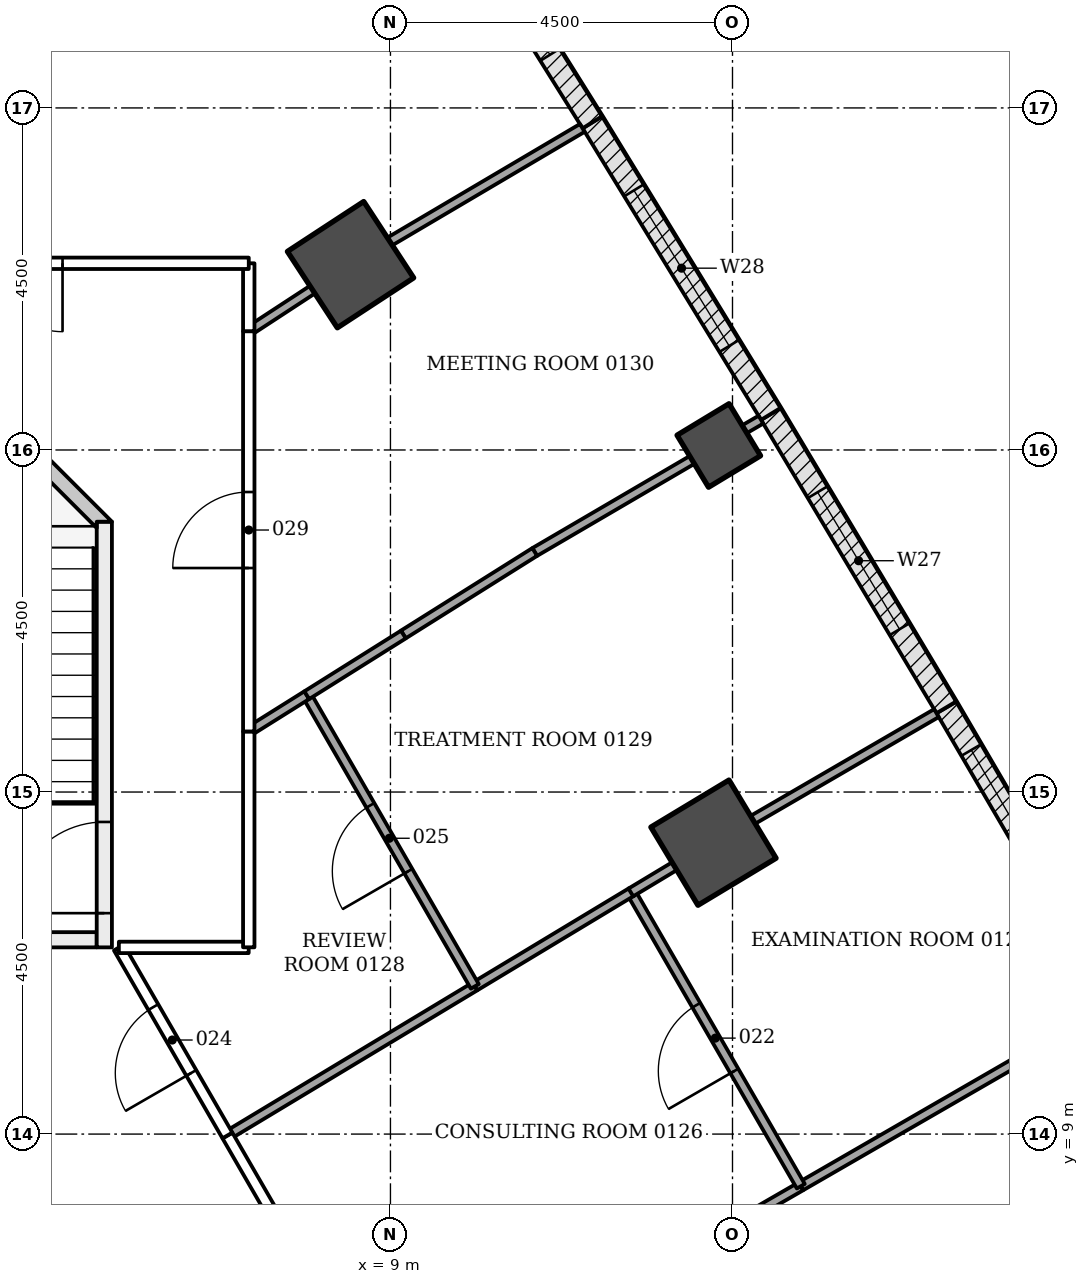
"""IFC4 building model, lengths in metres.
Left out: names, types, materials, properties, quantities, classifications, styles, units other than length and angle.
Written with IfcOpenShell. Run it as: python <this file> out.ifc"""

import sys

from ifc_helpers import new_model, si_unit, direction, frame, frame_2d, origin, origin_2d, place, context, subcontext, project, spatial, polyline, rectangle, outline, extrude, element, fill, save


model = new_model("IFC4")
c1 = context("Model", 3, precision=1e-05, world=origin(), true_north=direction((0.0, 1.0)))
c2 = subcontext(c1, "Body", "Model", "MODEL_VIEW")
j1 = project(units=[si_unit("LENGTHUNIT", "METRE"), si_unit("PLANEANGLEUNIT", "RADIAN")], contexts=[c1])
p1 = place(None, origin())
s1 = spatial("IfcSite", under=j1, at=p1, CompositionType="ELEMENT")
p2 = place(p1, origin())
s2 = spatial("IfcBuilding", under=s1, at=p2, CompositionType="ELEMENT")
p3 = place(p2, frame((0.0, 0.0, 6.0)))
s3 = spatial("IfcBuildingStorey", under=s2, at=p3, CompositionType="ELEMENT", Elevation=6.0)
for number, where, z_axis, x_axis in (
    (1, (13.25, 12.834, -0.25), (0.0, 0.0, 1.0), (0.857, 0.516, 0.0)),
    (2, (8.475, 20.438, -0.25), (0.0, 0.0, 1.0), (0.837, 0.547, 0.0)),
):
    element("IfcColumn", number, at=place(p3, frame(where, z_axis=z_axis, x_axis=x_axis)), inside=s3, PredefinedType="COLUMN", context=c2, shape_type="SweptSolid", body=[
        extrude(rectangle(XDim=1.2, YDim=1.2, at=origin_2d()), origin(), (0.0, 0.0, 1.0), 4.5),
    ])
p4 = place(p3, frame((13.32, 18.059, -0.25), z_axis=(0.0, 0.0, 1.0), x_axis=(0.855574189811, 0.517680215702, 0.0)))
e3 = element("IfcColumn", 3, at=p4, inside=s3, PredefinedType="COLUMN", context=c2, shape_type="SweptSolid", body=[
    extrude(rectangle(XDim=0.8, YDim=0.8, at=origin_2d()), origin(), (0.0, 0.0, 1.0), 4.5),
])
p5 = place(p3, frame((10.311, -4.703, -0.25), z_axis=(0.0, 0.0, 1.0), x_axis=(-0.500001446645, 0.866024568562, 0.0)))
e4 = element("IfcWall", 4, at=p5, inside=s3, PredefinedType="SHEAR", context=c2, shape_type="SweptSolid", body=[
    extrude(rectangle(XDim=18.458, YDim=0.7, at=frame_2d((9.229, 0.0))), origin(), (0.0, 0.0, 1.0), 4.5),
])
p6 = place(p5, frame((8.7, 0.0, 0.25)))
e5 = element("IfcOpeningElement", 5, at=p6, cuts=e4, PredefinedType="OPENING", context=c2, shape_type="SweptSolid", body=[
    extrude(rectangle(XDim=1.0, YDim=2.1, at=frame_2d((0.5, 1.05))), frame((0.0, 0.36, 0.0), z_axis=(0.0, -1.0, 0.0), x_axis=(1.0, 0.0, 0.0)), (0.0, 0.0, 1.0), 0.72),
])
p7 = place(p5, frame((4.002, 0.0, 0.25)))
e6 = element("IfcOpeningElement", 6, at=p7, cuts=e4, PredefinedType="OPENING", context=c2, shape_type="SweptSolid", body=[
    extrude(rectangle(XDim=0.9, YDim=2.1, at=frame_2d((0.45, 1.05))), frame((0.0, 0.36, 0.0), z_axis=(0.0, -1.0, 0.0), x_axis=(1.0, 0.0, 0.0)), (0.0, 0.0, 1.0), 0.72),
])
p8 = place(p5, frame((14.093, 0.0, 0.25)))
e7 = element("IfcOpeningElement", 7, at=p8, cuts=e4, PredefinedType="OPENING", context=c2, shape_type="SweptSolid", body=[
    extrude(rectangle(XDim=0.9, YDim=2.1, at=frame_2d((0.45, 1.05))), frame((0.0, 0.36, 0.0), z_axis=(0.0, -1.0, 0.0), x_axis=(1.0, 0.0, 0.0)), (0.0, 0.0, 1.0), 0.72),
])
p9 = place(p3, frame((16.314, 14.612, 0.0), z_axis=(0.0, 0.0, 1.0), x_axis=(0.50445499627, -0.86343798662, 0.0)))
e8 = element("IfcWall", 8, at=p9, inside=s3, PredefinedType="NOTDEFINED", context=c2, shape_type="SweptSolid", body=[
    extrude(rectangle(XDim=4.496, YDim=0.3, at=frame_2d((2.248, 0.0))), origin(), (0.0, 0.0, 1.0), 4.25),
])
p10 = place(p9, frame((0.648, 0.0, 0.8)))
e9 = element("IfcOpeningElement", 9, at=p10, cuts=e8, PredefinedType="OPENING", context=c2, shape_type="SweptSolid", body=[
    extrude(rectangle(XDim=3.2, YDim=2.7, at=frame_2d((1.6, 1.35))), frame((0.0, 0.16, 0.0), z_axis=(0.0, -1.0, 0.0), x_axis=(1.0, 0.0, 0.0)), (0.0, 0.0, 1.0), 0.32),
])
p11 = place(p3, frame((14.005, 18.472, 0.0), z_axis=(0.0, 0.0, 1.0), x_axis=(0.513257465408, -0.858234684805, 0.0)))
e10 = element("IfcWall", 10, at=p11, inside=s3, PredefinedType="NOTDEFINED", context=c2, shape_type="SweptSolid", body=[
    extrude(rectangle(XDim=4.496, YDim=0.3, at=frame_2d((2.248, 0.0))), origin(), (0.0, 0.0, 1.0), 4.25),
])
p12 = place(p11, frame((1.198, 0.0, 0.8)))
e11 = element("IfcOpeningElement", 11, at=p12, cuts=e10, PredefinedType="OPENING", context=c2, shape_type="SweptSolid", body=[
    extrude(rectangle(XDim=2.1, YDim=3.0, at=frame_2d((1.05, 1.5))), frame((0.0, 0.16, 0.0), z_axis=(0.0, -1.0, 0.0), x_axis=(1.0, 0.0, 0.0)), (0.0, 0.0, 1.0), 0.32),
])
p13 = place(p3, frame((11.656, 22.309, 0.0), z_axis=(0.0, 0.0, 1.0), x_axis=(0.522078085402, -0.852897691838, 0.0)))
e12 = element("IfcWall", 12, at=p13, inside=s3, PredefinedType="NOTDEFINED", context=c2, shape_type="SweptSolid", body=[
    extrude(rectangle(XDim=4.496, YDim=0.3, at=frame_2d((2.248, 0.0))), origin(), (0.0, 0.0, 1.0), 4.25),
])
p14 = place(p13, frame((1.048, 0.0, 0.9)))
e13 = element("IfcOpeningElement", 13, at=p14, cuts=e12, PredefinedType="OPENING", context=c2, shape_type="SweptSolid", body=[
    extrude(rectangle(XDim=2.4, YDim=2.4, at=frame_2d((1.2, 1.2))), frame((0.0, 0.16, 0.0), z_axis=(0.0, -1.0, 0.0), x_axis=(1.0, 0.0, 0.0)), (0.0, 0.0, 1.0), 0.32),
])
p15 = place(p3, frame((9.269, 26.122, 0.0), z_axis=(0.0, 0.0, 1.0), x_axis=(0.530804082031, -0.847494558389, 0.0)))
e14 = element("IfcWall", 14, at=p15, inside=s3, PredefinedType="NOTDEFINED", context=c2, shape_type="SweptSolid", body=[
    extrude(rectangle(XDim=4.496, YDim=0.3, at=frame_2d((2.248, 0.0))), origin(), (0.0, 0.0, 1.0), 4.25),
])
p16 = place(p15, frame((1.048, 0.0, 0.9)))
e15 = element("IfcOpeningElement", 15, at=p16, cuts=e14, PredefinedType="OPENING", context=c2, shape_type="SweptSolid", body=[
    extrude(rectangle(XDim=2.4, YDim=2.4, at=frame_2d((1.2, 1.2))), frame((0.0, 0.16, 0.0), z_axis=(0.0, -1.0, 0.0), x_axis=(1.0, 0.0, 0.0)), (0.0, 0.0, 1.0), 0.32),
])
p17 = place(p3, frame((5.135, 11.556, -0.25), z_axis=(0.0, 0.0, 1.0), x_axis=(-1.0, 0.0, 0.0)))
e16 = element("IfcWall", 16, at=p17, inside=s3, PredefinedType="SHEAR", context=c2, shape_type="SweptSolid", body=[
    extrude(rectangle(XDim=3.55, YDim=0.2, at=frame_2d((1.775, 0.0))), origin(), (0.0, 0.0, 1.0), 4.5),
])
p18 = place(p17, frame((1.175, 0.0, 0.25)))
e17 = element("IfcOpeningElement", 17, at=p18, cuts=e16, PredefinedType="OPENING", context=c2, shape_type="SweptSolid", body=[
    extrude(rectangle(XDim=1.2, YDim=2.1, at=frame_2d((0.6, 1.05))), frame((0.0, 0.11, 0.0), z_axis=(0.0, -1.0, 0.0), x_axis=(1.0, 0.0, 0.0)), (0.0, 0.0, 1.0), 0.22),
])
p19 = place(p3, frame((5.236, 11.456, -0.25), z_axis=(0.0, 0.0, 1.0), x_axis=(0.0, 1.0, 0.0)))
e18 = element("IfcWall", 18, at=p19, inside=s3, PredefinedType="SHEAR", context=c2, shape_type="SweptSolid", body=[
    extrude(rectangle(XDim=5.6, YDim=0.2, at=frame_2d((2.8, 0.0))), origin(), (0.0, 0.0, 1.0), 4.5),
])
p20 = place(p19, frame((0.45, 0.0, 0.25)))
e19 = element("IfcOpeningElement", 19, at=p20, cuts=e18, PredefinedType="OPENING", context=c2, shape_type="SweptSolid", body=[
    extrude(rectangle(XDim=1.2, YDim=2.1, at=frame_2d((0.6, 1.05))), frame((0.0, 0.11, 0.0), z_axis=(0.0, -1.0, 0.0), x_axis=(1.0, 0.0, 0.0)), (0.0, 0.0, 1.0), 0.22),
])
p21 = place(p3, frame((0.0, 0.0, -0.25)))
e20 = element("IfcWall", 20, at=p21, inside=s3, PredefinedType="SHEAR", context=c2, shape_type="SweptSolid", body=[
    extrude(outline(polyline([(5.336, 17.056), (3.736, 18.656), (1.586, 18.656), (1.586, 18.456), (3.653, 18.456), (5.135, 16.974), (5.135, 17.056), (5.135, 17.056), (5.135, 17.056), (5.135, 17.056), (5.135, 17.056), (5.135, 17.056), (5.135, 17.056), (5.135, 17.056), (5.135, 17.056), (5.135, 17.056), (5.135, 17.056), (5.135, 17.056), (5.135, 17.056), (5.135, 17.056), (5.135, 17.056), (5.135, 17.056), (5.135, 17.056), (5.336, 17.056)])), origin(), (0.0, 0.0, 1.0), 4.5),
])
p22 = place(p3, frame((9.03, 5.215, 0.0), z_axis=(0.0, 0.0, 1.0), x_axis=(-0.500070818246, 0.86598451299, 0.0)))
e21 = element("IfcWall", 21, at=p22, inside=s3, PredefinedType="PARTITIONING", context=c2, shape_type="SweptSolid", body=[
    extrude(rectangle(XDim=4.347, YDim=0.15, at=frame_2d((2.174, 0.0))), origin(), (0.0, 0.0, 1.0), 3.638),
])
p23 = place(p22, frame((1.65, 0.0, 0.0)))
e22 = element("IfcOpeningElement", 22, at=p23, cuts=e21, PredefinedType="OPENING", context=c2, shape_type="SweptSolid", body=[
    extrude(rectangle(XDim=1.0, YDim=2.1, at=frame_2d((0.5, 1.05))), frame((0.0, 0.085, 0.0), z_axis=(0.0, -1.0, 0.0), x_axis=(1.0, 0.0, 0.0)), (0.0, 0.0, 1.0), 0.17),
])
p24 = place(p3, frame((6.855, 8.982, 0.0), z_axis=(0.0, 0.0, 1.0), x_axis=(-0.500176439337, 0.865923512519, 0.0)))
e23 = element("IfcWall", 23, at=p24, inside=s3, PredefinedType="PARTITIONING", context=c2, shape_type="SweptSolid", body=[
    extrude(rectangle(XDim=2.855, YDim=0.15, at=frame_2d((1.427, 0.0))), origin(), (0.0, 0.0, 1.0), 3.638),
])
p25 = place(p24, frame((0.95, 0.0, 0.0)))
e24 = element("IfcOpeningElement", 24, at=p25, cuts=e23, PredefinedType="OPENING", context=c2, shape_type="SweptSolid", body=[
    extrude(rectangle(XDim=1.0, YDim=2.1, at=frame_2d((0.5, 1.05))), frame((0.0, 0.085, 0.0), z_axis=(0.0, -1.0, 0.0), x_axis=(1.0, 0.0, 0.0)), (0.0, 0.0, 1.0), 0.17),
])
p26 = place(p3, frame((5.427, 11.456, 0.0), z_axis=(0.0, 0.0, 1.0), x_axis=(1.0, 0.0, 0.0)))
e25 = element("IfcWall", 25, at=p26, inside=s3, PredefinedType="PARTITIONING", context=c2, shape_type="SweptSolid", body=[
    extrude(rectangle(XDim=1.708, YDim=0.15, at=frame_2d((0.854, 0.0))), origin(), (0.0, 0.0, 1.0), 4.25),
])
p27 = place(p3, frame((7.136, 11.457, 0.0), z_axis=(0.0, 0.0, 1.0), x_axis=(0.0, 1.0, 0.0)))
e26 = element("IfcWall", 26, at=p27, inside=s3, PredefinedType="PARTITIONING", context=c2, shape_type="SweptSolid", body=[
    extrude(rectangle(XDim=2.839, YDim=0.15, at=frame_2d((1.419, 0.0))), origin(), (0.0, 0.0, 1.0), 3.638),
])
p28 = place(p3, frame((7.136, 14.297, 0.0), z_axis=(0.0, 0.0, 1.0), x_axis=(0.0, 1.0, 0.0)))
e27 = element("IfcWall", 27, at=p28, inside=s3, PredefinedType="PARTITIONING", context=c2, shape_type="SweptSolid", body=[
    extrude(rectangle(XDim=5.265, YDim=0.15, at=frame_2d((2.632, 0.0))), origin(), (0.0, 0.0, 1.0), 3.638),
])
p29 = place(p28, frame((2.15, 0.0, 0.0)))
e28 = element("IfcOpeningElement", 28, at=p29, cuts=e27, PredefinedType="OPENING", context=c2, shape_type="SweptSolid", body=[
    extrude(rectangle(XDim=1.0, YDim=2.1, at=frame_2d((0.5, 1.05))), frame((0.0, 0.085, 0.0), z_axis=(0.0, -1.0, 0.0), x_axis=(1.0, 0.0, 0.0)), (0.0, 0.0, 1.0), 0.17),
])
p30 = place(p3, frame((7.136, 19.563, 0.0), z_axis=(0.0, 0.0, 1.0), x_axis=(0.0, 1.0, 0.0)))
e29 = element("IfcWall", 29, at=p30, inside=s3, PredefinedType="PARTITIONING", context=c2, shape_type="SweptSolid", body=[
    extrude(rectangle(XDim=0.893, YDim=0.15, at=frame_2d((0.447, 0.0))), origin(), (0.0, 0.0, 1.0), 3.638),
])
p31 = place(p3, frame((7.136, 20.456, 0.0), z_axis=(0.0, 0.0, 1.0), x_axis=(-1.0, 0.0, 0.0)))
e30 = element("IfcWall", 30, at=p31, inside=s3, PredefinedType="PARTITIONING", context=c2, shape_type="SweptSolid", body=[
    extrude(rectangle(XDim=6.686, YDim=0.15, at=frame_2d((3.343, 0.0))), origin(), (0.0, 0.0, 1.0), 3.638),
])
p32 = place(p31, frame((2.45, 0.0, 0.0)))
e31 = element("IfcOpeningElement", 31, at=p32, cuts=e30, PredefinedType="OPENING", context=c2, shape_type="SweptSolid", body=[
    extrude(rectangle(XDim=1.8, YDim=2.1, at=frame_2d((0.9, 1.05))), frame((0.0, 0.085, 0.0), z_axis=(0.0, -1.0, 0.0), x_axis=(1.0, 0.0, 0.0)), (0.0, 0.0, 1.0), 0.17),
])
p33 = place(p3, frame((14.4, 8.313, 0.0), z_axis=(0.0, 0.0, 1.0), x_axis=(-0.866114094298, -0.499846352051, 0.0)))
e32 = element("IfcWall", 32, at=p33, inside=s3, PredefinedType="PARTITIONING", context=c2, shape_type="SweptSolid", body=[
    extrude(rectangle(XDim=6.198, YDim=0.12, at=frame_2d((3.099, 0.0))), origin(), (0.0, 0.0, 1.0), 3.638),
])
p34 = place(p3, frame((17.543, 10.128, 0.0), z_axis=(0.0, 0.0, 1.0), x_axis=(-0.866039913117, -0.499974868256, 0.0)))
e33 = element("IfcWall", 33, at=p34, inside=s3, PredefinedType="PARTITIONING", context=c2, shape_type="SweptSolid", body=[
    extrude(rectangle(XDim=3.628, YDim=0.12, at=frame_2d((1.814, 0.0))), origin(), (0.0, 0.0, 1.0), 3.638),
])
p35 = place(p3, frame((14.399, 8.314, 0.0), z_axis=(0.0, 0.0, 1.0), x_axis=(-0.49998599166, 0.866033491352, 0.0)))
e34 = element("IfcWall", 34, at=p35, inside=s3, PredefinedType="PARTITIONING", context=c2, shape_type="SweptSolid", body=[
    extrude(rectangle(XDim=4.464, YDim=0.12, at=frame_2d((2.232, 0.0))), origin(), (0.0, 0.0, 1.0), 3.638),
])
p36 = place(p35, frame((1.75, 0.0, 0.0)))
e35 = element("IfcOpeningElement", 35, at=p36, cuts=e34, PredefinedType="OPENING", context=c2, shape_type="SweptSolid", body=[
    extrude(rectangle(XDim=1.0, YDim=2.1, at=frame_2d((0.5, 1.05))), frame((0.0, 0.07, 0.0), z_axis=(0.0, -1.0, 0.0), x_axis=(1.0, 0.0, 0.0)), (0.0, 0.0, 1.0), 0.14),
])
p37 = place(p3, frame((10.111, 10.942, 0.0), z_axis=(0.0, 0.0, 1.0), x_axis=(-0.856624092601, -0.515941046996, 0.0)))
e36 = element("IfcWall", 36, at=p37, inside=s3, PredefinedType="PARTITIONING", context=c2, shape_type="SweptSolid", body=[
    extrude(rectangle(XDim=3.799, YDim=0.12, at=frame_2d((1.899, 0.0))), origin(), (0.0, 0.0, 1.0), 3.638),
])
p38 = place(p3, frame((12.171, 12.184, 0.0), z_axis=(0.0, 0.0, 1.0), x_axis=(-0.856451683682, -0.516227191765, 0.0)))
e37 = element("IfcWall", 37, at=p38, inside=s3, PredefinedType="PARTITIONING", context=c2, shape_type="SweptSolid", body=[
    extrude(rectangle(XDim=2.404, YDim=0.12, at=frame_2d((1.202, 0.0))), origin(), (0.0, 0.0, 1.0), 3.638),
])
p39 = place(p3, frame((12.736, 12.524, 0.0), z_axis=(0.0, 0.0, 1.0), x_axis=(-0.856718959006, -0.515783506211, 0.0)))
e38 = element("IfcWall", 38, at=p39, inside=s3, PredefinedType="PARTITIONING", context=c2, shape_type="SweptSolid", body=[
    extrude(rectangle(XDim=0.669, YDim=0.12, at=frame_2d((0.334, 0.0))), origin(), (0.0, 0.0, 1.0), 3.638),
])
p40 = place(p3, frame((16.183, 14.538, 0.0), z_axis=(0.0, 0.0, 1.0), x_axis=(-0.864576979504, -0.50250039454, 0.0)))
e39 = element("IfcWall", 39, at=p40, inside=s3, PredefinedType="PARTITIONING", context=c2, shape_type="SweptSolid", body=[
    extrude(rectangle(XDim=2.792, YDim=0.12, at=frame_2d((1.396, 0.0))), origin(), (0.0, 0.0, 1.0), 3.633),
])
p41 = place(p3, frame((10.11, 10.943, 0.0), z_axis=(0.0, 0.0, 1.0), x_axis=(-0.49990879683, 0.866078053556, 0.0)))
e40 = element("IfcWall", 40, at=p41, inside=s3, PredefinedType="PARTITIONING", context=c2, shape_type="SweptSolid", body=[
    extrude(rectangle(XDim=4.423, YDim=0.12, at=frame_2d((2.211, 0.0))), origin(), (0.0, 0.0, 1.0), 3.638),
])
p42 = place(p41, frame((1.75, 0.0, 0.0)))
e41 = element("IfcOpeningElement", 41, at=p42, cuts=e40, PredefinedType="OPENING", context=c2, shape_type="SweptSolid", body=[
    extrude(rectangle(XDim=1.0, YDim=2.1, at=frame_2d((0.5, 1.05))), frame((0.0, 0.07, 0.0), z_axis=(0.0, -1.0, 0.0), x_axis=(1.0, 0.0, 0.0)), (0.0, 0.0, 1.0), 0.14),
])
p43 = place(p3, frame((7.899, 14.774, 0.0), z_axis=(0.0, 0.0, 1.0), x_axis=(-0.847402109943, -0.530951658877, 0.0)))
e42 = element("IfcWall", 42, at=p43, inside=s3, PredefinedType="PARTITIONING", context=c2, shape_type="SweptSolid", body=[
    extrude(rectangle(XDim=0.898, YDim=0.12, at=frame_2d((0.449, 0.0))), origin(), (0.0, 0.0, 1.0), 3.638),
])
p44 = place(p3, frame((12.968, 17.869, 0.0), z_axis=(0.0, 0.0, 1.0), x_axis=(-0.863161652457, -0.504927679701, 0.0)))
e43 = element("IfcWall", 43, at=p44, inside=s3, PredefinedType="PARTITIONING", context=c2, shape_type="SweptSolid", body=[
    extrude(rectangle(XDim=2.398, YDim=0.12, at=frame_2d((1.199, 0.0))), origin(), (0.0, 0.0, 1.0), 3.638),
])
p45 = place(p3, frame((10.898, 16.658, 0.0), z_axis=(0.0, 0.0, 1.0), x_axis=(-0.846907532623, -0.531740191435, 0.0)))
e44 = element("IfcWall", 44, at=p45, inside=s3, PredefinedType="PARTITIONING", context=c2, shape_type="SweptSolid", body=[
    extrude(rectangle(XDim=2.04, YDim=0.12, at=frame_2d((1.02, 0.0))), origin(), (0.0, 0.0, 1.0), 3.638),
])
p46 = place(p3, frame((9.17, 15.572, 0.0), z_axis=(0.0, 0.0, 1.0), x_axis=(-0.846881470123, -0.531781699161, 0.0)))
e45 = element("IfcWall", 45, at=p46, inside=s3, PredefinedType="PARTITIONING", context=c2, shape_type="SweptSolid", body=[
    extrude(rectangle(XDim=1.501, YDim=0.12, at=frame_2d((0.75, 0.0))), origin(), (0.0, 0.0, 1.0), 3.638),
])
p47 = place(p3, frame((13.874, 18.399, 0.0), z_axis=(0.0, 0.0, 1.0), x_axis=(-0.863885093979, -0.503688936151, 0.0)))
e46 = element("IfcWall", 46, at=p47, inside=s3, PredefinedType="PARTITIONING", context=c2, shape_type="SweptSolid", body=[
    extrude(rectangle(XDim=0.25, YDim=0.12, at=frame_2d((0.125, 0.0))), origin(), (0.0, 0.0, 1.0), 4.25),
])
p48 = place(p3, frame((7.973, 20.109, 0.0), z_axis=(0.0, 0.0, 1.0), x_axis=(-0.836986858992, -0.547222987341, 0.0)))
e47 = element("IfcWall", 47, at=p48, inside=s3, PredefinedType="PARTITIONING", context=c2, shape_type="SweptSolid", body=[
    extrude(rectangle(XDim=0.998, YDim=0.12, at=frame_2d((0.499, 0.0))), origin(), (0.0, 0.0, 1.0), 3.638),
])
p49 = place(p3, frame((11.524, 22.237, 0.0), z_axis=(0.0, 0.0, 1.0), x_axis=(-0.861228913487, -0.508217235613, 0.0)))
e48 = element("IfcWall", 48, at=p49, inside=s3, PredefinedType="PARTITIONING", context=c2, shape_type="SweptSolid", body=[
    extrude(rectangle(XDim=2.94, YDim=0.12, at=frame_2d((1.47, 0.0))), origin(), (0.0, 0.0, 1.0), 3.633),
])
p50 = place(p10, origin())
e49 = element("IfcWindow", 49, at=p50, inside=s3, PartitioningType="TRIPLE_PANEL_VERTICAL", PredefinedType="WINDOW", context=c2, shape_type="SweptSolid", body=[
    extrude(rectangle(XDim=3.2, YDim=2.7, at=frame_2d((1.6, 1.35))), frame((0.0, 0.03, 0.0), z_axis=(0.0, -1.0, 0.0), x_axis=(1.0, 0.0, 0.0)), (0.0, 0.0, 1.0), 0.06),
])
fill(e9, e49)
p51 = place(p12, origin())
e50 = element("IfcWindow", 50, at=p51, inside=s3, PartitioningType="DOUBLE_PANEL_HORIZONTAL", PredefinedType="WINDOW", context=c2, shape_type="SweptSolid", body=[
    extrude(rectangle(XDim=2.1, YDim=3.0, at=frame_2d((1.05, 1.5))), frame((0.0, 0.03, 0.0), z_axis=(0.0, -1.0, 0.0), x_axis=(1.0, 0.0, 0.0)), (0.0, 0.0, 1.0), 0.06),
])
fill(e11, e50)
p52 = place(p14, origin())
e51 = element("IfcWindow", 51, at=p52, inside=s3, PartitioningType="DOUBLE_PANEL_VERTICAL", PredefinedType="WINDOW", context=c2, shape_type="SweptSolid", body=[
    extrude(rectangle(XDim=2.4, YDim=2.4, at=frame_2d((1.2, 1.2))), frame((0.0, 0.03, 0.0), z_axis=(0.0, -1.0, 0.0), x_axis=(1.0, 0.0, 0.0)), (0.0, 0.0, 1.0), 0.06),
])
fill(e13, e51)
p53 = place(p16, origin())
e52 = element("IfcWindow", 52, at=p53, inside=s3, PartitioningType="DOUBLE_PANEL_VERTICAL", PredefinedType="WINDOW", context=c2, shape_type="SweptSolid", body=[
    extrude(rectangle(XDim=2.4, YDim=2.4, at=frame_2d((1.2, 1.2))), frame((0.0, 0.03, 0.0), z_axis=(0.0, -1.0, 0.0), x_axis=(1.0, 0.0, 0.0)), (0.0, 0.0, 1.0), 0.06),
])
fill(e15, e52)
p54 = place(p20, origin())
e53 = element("IfcDoor", 53, at=p54, inside=s3, OperationType="SINGLE_SWING_LEFT", PredefinedType="DOOR", context=c2, shape_type="SweptSolid", body=[
    extrude(rectangle(XDim=1.2, YDim=2.1, at=frame_2d((0.6, 1.05))), frame((0.0, 0.025, 0.0), z_axis=(0.0, -1.0, 0.0), x_axis=(1.0, 0.0, 0.0)), (0.0, 0.0, 1.0), 0.05),
])
fill(e19, e53)
p55 = place(p36, origin())
e54 = element("IfcDoor", 54, at=p55, inside=s3, OperationType="SINGLE_SWING_LEFT", PredefinedType="DOOR", context=c2, shape_type="SweptSolid", body=[
    extrude(rectangle(XDim=1.0, YDim=2.1, at=frame_2d((0.5, 1.05))), frame((0.0, 0.025, 0.0), z_axis=(0.0, -1.0, 0.0), x_axis=(1.0, 0.0, 0.0)), (0.0, 0.0, 1.0), 0.05),
])
fill(e35, e54)
p56 = place(p25, origin())
e55 = element("IfcDoor", 55, at=p56, inside=s3, OperationType="SINGLE_SWING_LEFT", PredefinedType="DOOR", context=c2, shape_type="SweptSolid", body=[
    extrude(rectangle(XDim=1.0, YDim=2.1, at=frame_2d((0.5, 1.05))), frame((0.0, 0.025, 0.0), z_axis=(0.0, -1.0, 0.0), x_axis=(1.0, 0.0, 0.0)), (0.0, 0.0, 1.0), 0.05),
])
fill(e24, e55)
p57 = place(p42, origin())
e56 = element("IfcDoor", 56, at=p57, inside=s3, OperationType="SINGLE_SWING_LEFT", PredefinedType="DOOR", context=c2, shape_type="SweptSolid", body=[
    extrude(rectangle(XDim=1.0, YDim=2.1, at=frame_2d((0.5, 1.05))), frame((0.0, 0.025, 0.0), z_axis=(0.0, -1.0, 0.0), x_axis=(1.0, 0.0, 0.0)), (0.0, 0.0, 1.0), 0.05),
])
fill(e41, e56)
p58 = place(p29, origin())
e57 = element("IfcDoor", 57, at=p58, inside=s3, OperationType="SINGLE_SWING_LEFT", PredefinedType="DOOR", context=c2, shape_type="SweptSolid", body=[
    extrude(rectangle(XDim=1.0, YDim=2.1, at=frame_2d((0.5, 1.05))), frame((0.0, 0.025, 0.0), z_axis=(0.0, -1.0, 0.0), x_axis=(1.0, 0.0, 0.0)), (0.0, 0.0, 1.0), 0.05),
])
fill(e28, e57)
p59 = place(p32, origin())
e58 = element("IfcDoor", 58, at=p59, inside=s3, OperationType="DOUBLE_DOOR_SINGLE_SWING", PredefinedType="DOOR", context=c2, shape_type="SweptSolid", body=[
    extrude(rectangle(XDim=1.8, YDim=2.1, at=frame_2d((0.9, 1.05))), frame((0.0, 0.025, 0.0), z_axis=(0.0, -1.0, 0.0), x_axis=(1.0, 0.0, 0.0)), (0.0, 0.0, 1.0), 0.05),
])
fill(e31, e58)
save(model, sys.argv[1])
